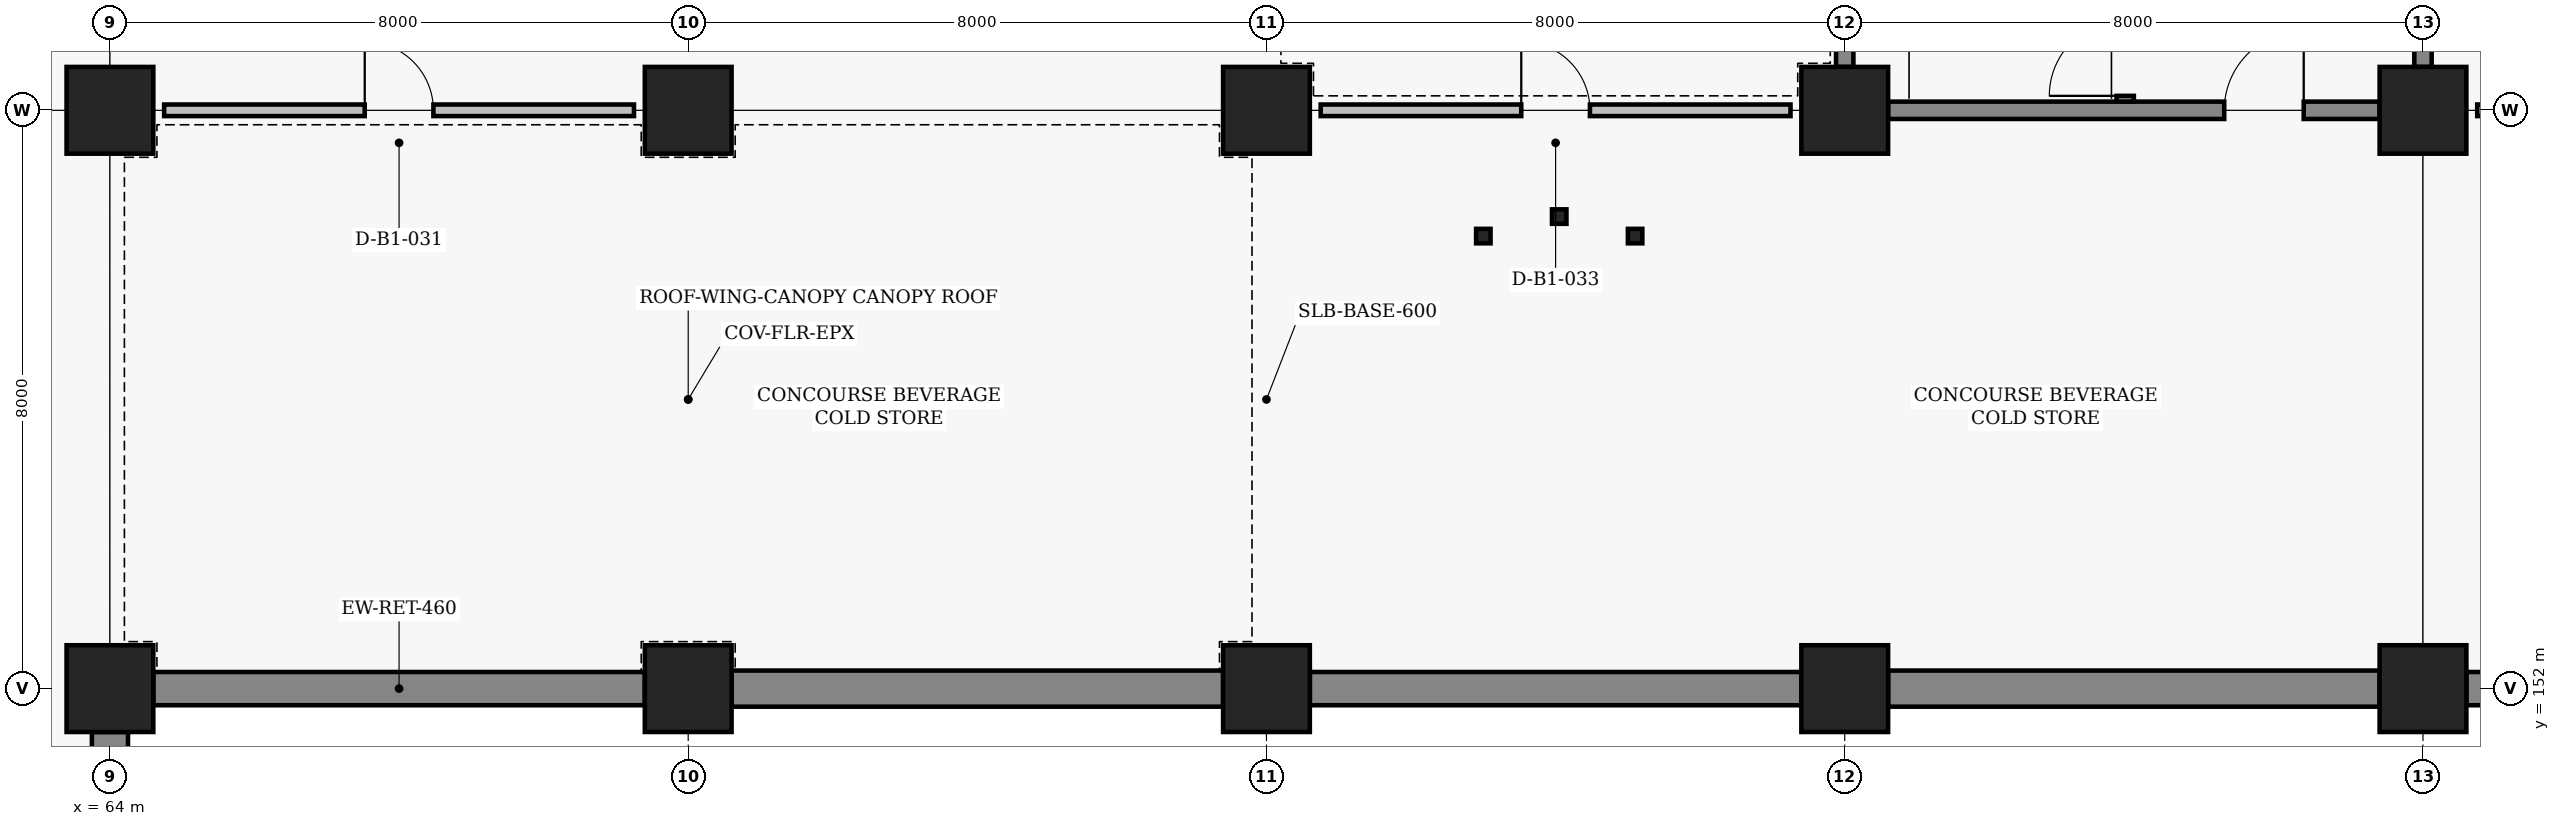
"""IFC4 building model, lengths in metres.
Left out: names, types, materials, properties, quantities, classifications, styles, units other than length and angle.
Written with IfcOpenShell. Run it as: python <this file> out.ifc"""

import sys

from ifc_helpers import new_model, si_unit, direction, frame, frame_2d, origin, origin_2d, place, context, subcontext, project, spatial, rectangle, hollow_rectangle, extrude, element, fill, save


model = new_model("IFC4")
c1 = context("Model", 3, precision=1e-05, world=origin(), true_north=direction((0.0, 1.0)))
c2 = subcontext(c1, "Body", "Model", "MODEL_VIEW")
j1 = project(units=[si_unit("LENGTHUNIT", "METRE"), si_unit("PLANEANGLEUNIT", "RADIAN")], contexts=[c1])
p1 = place(None, origin())
s1 = spatial("IfcSite", under=j1, at=p1, CompositionType="ELEMENT")
p2 = place(p1, origin())
s2 = spatial("IfcBuilding", under=s1, at=p2, CompositionType="ELEMENT")
p3 = place(p2, frame((0.0, 0.0, -5.4)))
s3 = spatial("IfcBuildingStorey", under=s2, at=p3, CompositionType="ELEMENT", Elevation=-5.4)
for number, where, z_axis, x_axis in (
    (1, (64.0, 152.0, 0.0), (0.0, 0.0, 1.0), (1.0, 0.0, 0.0)),
    (2, (64.0, 160.0, 0.0), (0.0, 0.0, 1.0), (1.0, 0.0, 0.0)),
    (3, (72.0, 152.0, 0.0), (0.0, 0.0, 1.0), (1.0, 0.0, 0.0)),
    (4, (72.0, 160.0, 0.0), (0.0, 0.0, 1.0), (1.0, 0.0, 0.0)),
    (5, (80.0, 152.0, 0.0), (0.0, 0.0, 1.0), (1.0, 0.0, 0.0)),
    (6, (80.0, 160.0, 0.0), (0.0, 0.0, 1.0), (1.0, 0.0, 0.0)),
    (7, (88.0, 152.0, 0.0), (0.0, 0.0, 1.0), (1.0, 0.0, 0.0)),
    (8, (88.0, 160.0, 0.0), (0.0, 0.0, 1.0), (1.0, 0.0, 0.0)),
    (9, (96.0, 152.0, 0.0), (0.0, 0.0, 1.0), (1.0, 0.0, 0.0)),
    (10, (96.0, 160.0, 0.0), (0.0, 0.0, 1.0), (1.0, 0.0, 0.0)),
):
    element("IfcColumn", number, at=place(p3, frame(where, z_axis=z_axis, x_axis=x_axis)), inside=s3, PredefinedType="COLUMN", context=c2, shape_type="SweptSolid", body=[
        extrude(rectangle(XDim=1.2, YDim=1.2, at=origin_2d()), origin(), (0.0, 0.0, 1.0), 5.4),
    ])
p4 = place(p3, frame((64.0, 144.6, 0.0), z_axis=(0.0, 0.0, 1.0), x_axis=(0.0, 1.0, 0.0)))
e11 = element("IfcWall", 11, at=p4, inside=s3, PredefinedType="STANDARD", context=c2, shape_type="SweptSolid", body=[
    extrude(rectangle(XDim=6.8, YDim=0.5, at=frame_2d((3.4, 0.0))), origin(), (0.0, 0.0, 1.0), 4.24),
])
p5 = place(p3, frame((64.6, 152.0, 0.0), z_axis=(0.0, 0.0, 1.0), x_axis=(1.0, 0.0, 0.0)))
e12 = element("IfcWall", 12, at=p5, inside=s3, PredefinedType="STANDARD", context=c2, shape_type="SweptSolid", body=[
    extrude(rectangle(XDim=6.8, YDim=0.46, at=frame_2d((3.4, 0.0))), origin(), (0.0, 0.0, 1.0), 4.24),
])
p6 = place(p3, frame((72.6, 152.0, 0.0), z_axis=(0.0, 0.0, 1.0), x_axis=(1.0, 0.0, 0.0)))
e13 = element("IfcWall", 13, at=p6, inside=s3, PredefinedType="STANDARD", context=c2, shape_type="SweptSolid", body=[
    extrude(rectangle(XDim=6.8, YDim=0.5, at=frame_2d((3.4, 0.0))), origin(), (0.0, 0.0, 1.0), 4.34),
])
p7 = place(p3, frame((80.6, 152.0, 0.0), z_axis=(0.0, 0.0, 1.0), x_axis=(1.0, 0.0, 0.0)))
e14 = element("IfcWall", 14, at=p7, inside=s3, PredefinedType="STANDARD", context=c2, shape_type="SweptSolid", body=[
    extrude(rectangle(XDim=6.8, YDim=0.46, at=frame_2d((3.4, 0.0))), origin(), (0.0, 0.0, 1.0), 4.34),
])
p8 = place(p3, frame((88.6, 152.0, 0.0), z_axis=(0.0, 0.0, 1.0), x_axis=(1.0, 0.0, 0.0)))
e15 = element("IfcWall", 15, at=p8, inside=s3, PredefinedType="STANDARD", context=c2, shape_type="SweptSolid", body=[
    extrude(rectangle(XDim=6.8, YDim=0.5, at=frame_2d((3.4, 0.0))), origin(), (0.0, 0.0, 1.0), 4.34),
])
p9 = place(p3, frame((96.6, 152.0, 0.0), z_axis=(0.0, 0.0, 1.0), x_axis=(1.0, 0.0, 0.0)))
e16 = element("IfcWall", 16, at=p9, inside=s3, PredefinedType="STANDARD", context=c2, shape_type="SweptSolid", body=[
    extrude(rectangle(XDim=6.8, YDim=0.46, at=frame_2d((3.4, 0.0))), origin(), (0.0, 0.0, 1.0), 4.34),
])
p10 = place(p3, frame((88.6, 160.0, 0.0), z_axis=(0.0, 0.0, 1.0), x_axis=(1.0, 0.0, 0.0)))
e17 = element("IfcWall", 17, at=p10, inside=s3, PredefinedType="SHEAR", context=c2, shape_type="SweptSolid", body=[
    extrude(rectangle(XDim=6.8, YDim=0.24, at=frame_2d((3.4, 0.0))), origin(), (0.0, 0.0, 1.0), 4.59),
])
p11 = place(p10, frame((4.65, 0.0, 0.0)))
e18 = element("IfcOpeningElement", 18, at=p11, cuts=e17, PredefinedType="OPENING", context=c2, shape_type="SweptSolid", body=[
    extrude(rectangle(XDim=1.1, YDim=2.2, at=frame_2d((0.55, 1.1))), frame((0.0, 0.13, 0.0), z_axis=(0.0, -1.0, 0.0), x_axis=(1.0, 0.0, 0.0)), (0.0, 0.0, 1.0), 0.26),
])
for number, where, z_axis, x_axis in (
    (19, (88.0, 160.6, 0.0), (0.0, 0.0, 1.0), (0.0, 1.0, 0.0)),
    (20, (96.0, 160.6, 0.0), (0.0, 0.0, 1.0), (0.0, 1.0, 0.0)),
):
    element("IfcWall", number, at=place(p3, frame(where, z_axis=z_axis, x_axis=x_axis)), inside=s3, PredefinedType="SHEAR", context=c2, shape_type="SweptSolid", body=[
        extrude(rectangle(XDim=6.8, YDim=0.24, at=frame_2d((3.4, 0.0))), origin(), (0.0, 0.0, 1.0), 4.39),
    ])
p12 = place(p3, frame((91.88, 160.12, 0.0), z_axis=(0.0, 0.0, 1.0), x_axis=(0.0, 1.0, 0.0)))
e21 = element("IfcWall", 21, at=p12, inside=s3, PredefinedType="SHEAR", context=c2, shape_type="SweptSolid", body=[
    extrude(rectangle(XDim=7.76, YDim=0.24, at=frame_2d((3.88, 0.0))), origin(), (0.0, 0.0, 1.0), 4.59),
])
p13 = place(p12, frame((0.08, 0.0, 0.0)))
e22 = element("IfcOpeningElement", 22, at=p13, cuts=e21, PredefinedType="OPENING", context=c2, shape_type="SweptSolid", body=[
    extrude(rectangle(XDim=1.05, YDim=2.15, at=frame_2d((0.525, 1.075))), frame((0.0, 0.13, 0.0), z_axis=(0.0, -1.0, 0.0), x_axis=(1.0, 0.0, 0.0)), (0.0, 0.0, 1.0), 0.26),
])
for number, where, z_axis, x_axis in (
    (23, (83.0, 158.26, 0.0), (0.0, 0.0, 1.0), (1.0, 0.0, 0.0)),
    (24, (85.1, 158.26, 0.0), (0.0, 0.0, 1.0), (1.0, 0.0, 0.0)),
    (25, (84.05, 158.53, 0.0), (0.0, 0.0, 1.0), (1.0, 0.0, 0.0)),
):
    element("IfcColumn", number, at=place(p3, frame(where, z_axis=z_axis, x_axis=x_axis)), inside=s3, PredefinedType="COLUMN", context=c2, shape_type="SweptSolid", body=[
        extrude(hollow_rectangle(XDim=0.2, YDim=0.2, WallThickness=0.009, at=origin_2d()), origin(), (0.0, 0.0, 1.0), 5.4),
    ])
p14 = place(p3, frame((64.75, 160.0, 0.0), z_axis=(0.0, 0.0, 1.0), x_axis=(1.0, 0.0, 0.0)))
e26 = element("IfcWall", 26, at=p14, inside=s3, PredefinedType="PARTITIONING", context=c2, shape_type="SweptSolid", body=[
    extrude(rectangle(XDim=6.5, YDim=0.16, at=frame_2d((3.25, 0.0))), origin(), (0.0, 0.0, 1.0), 3.69),
])
p15 = place(p14, frame((2.775, 0.0, 0.0)))
e27 = element("IfcOpeningElement", 27, at=p15, cuts=e26, PredefinedType="OPENING", context=c2, shape_type="SweptSolid", body=[
    extrude(rectangle(XDim=0.95, YDim=2.1, at=frame_2d((0.475, 1.05))), frame((0.0, 0.09, 0.0), z_axis=(0.0, -1.0, 0.0), x_axis=(1.0, 0.0, 0.0)), (0.0, 0.0, 1.0), 0.18),
])
p16 = place(p3, frame((80.75, 160.0, 0.0), z_axis=(0.0, 0.0, 1.0), x_axis=(1.0, 0.0, 0.0)))
e28 = element("IfcWall", 28, at=p16, inside=s3, PredefinedType="PARTITIONING", context=c2, shape_type="SweptSolid", body=[
    extrude(rectangle(XDim=6.5, YDim=0.16, at=frame_2d((3.25, 0.0))), origin(), (0.0, 0.0, 1.0), 4.49),
])
p17 = place(p16, frame((2.775, 0.0, 0.0)))
e29 = element("IfcOpeningElement", 29, at=p17, cuts=e28, PredefinedType="OPENING", context=c2, shape_type="SweptSolid", body=[
    extrude(rectangle(XDim=0.95, YDim=2.1, at=frame_2d((0.475, 1.05))), frame((0.0, 0.09, 0.0), z_axis=(0.0, -1.0, 0.0), x_axis=(1.0, 0.0, 0.0)), (0.0, 0.0, 1.0), 0.18),
])
p18 = place(p3, frame((96.75, 160.0, 0.0), z_axis=(0.0, 0.0, 1.0), x_axis=(1.0, 0.0, 0.0)))
e30 = element("IfcWall", 30, at=p18, inside=s3, PredefinedType="PARTITIONING", context=c2, shape_type="SweptSolid", body=[
    extrude(rectangle(XDim=6.5, YDim=0.16, at=frame_2d((3.25, 0.0))), origin(), (0.0, 0.0, 1.0), 4.49),
])
p19 = place(p18, frame((2.775, 0.0, 0.0)))
e31 = element("IfcOpeningElement", 31, at=p19, cuts=e30, PredefinedType="OPENING", context=c2, shape_type="SweptSolid", body=[
    extrude(rectangle(XDim=0.95, YDim=2.1, at=frame_2d((0.475, 1.05))), frame((0.0, 0.09, 0.0), z_axis=(0.0, -1.0, 0.0), x_axis=(1.0, 0.0, 0.0)), (0.0, 0.0, 1.0), 0.18),
])
p20 = place(p11, origin())
e32 = element("IfcDoor", 32, at=p20, inside=s3, OperationType="SINGLE_SWING_RIGHT", PredefinedType="DOOR", context=c2, shape_type="SweptSolid", body=[
    extrude(rectangle(XDim=1.1, YDim=2.2, at=frame_2d((0.55, 1.1))), frame((0.0, 0.025, 0.0), z_axis=(0.0, -1.0, 0.0), x_axis=(1.0, 0.0, 0.0)), (0.0, 0.0, 1.0), 0.05),
])
fill(e18, e32)
p21 = place(p13, origin())
e33 = element("IfcDoor", 33, at=p21, inside=s3, OperationType="SINGLE_SWING_LEFT", PredefinedType="DOOR", context=c2, shape_type="SweptSolid", body=[
    extrude(rectangle(XDim=1.05, YDim=2.15, at=frame_2d((0.525, 1.075))), frame((0.0, 0.025, 0.0), z_axis=(0.0, -1.0, 0.0), x_axis=(1.0, 0.0, 0.0)), (0.0, 0.0, 1.0), 0.05),
])
fill(e22, e33)
p22 = place(p15, origin())
e34 = element("IfcDoor", 34, at=p22, inside=s3, OperationType="SINGLE_SWING_LEFT", PredefinedType="DOOR", context=c2, shape_type="SweptSolid", body=[
    extrude(rectangle(XDim=0.95, YDim=2.1, at=frame_2d((0.475, 1.05))), frame((0.0, 0.025, 0.0), z_axis=(0.0, -1.0, 0.0), x_axis=(1.0, 0.0, 0.0)), (0.0, 0.0, 1.0), 0.05),
])
fill(e27, e34)
p23 = place(p17, origin())
e35 = element("IfcDoor", 35, at=p23, inside=s3, OperationType="SINGLE_SWING_LEFT", PredefinedType="DOOR", context=c2, shape_type="SweptSolid", body=[
    extrude(rectangle(XDim=0.95, YDim=2.1, at=frame_2d((0.475, 1.05))), frame((0.0, 0.025, 0.0), z_axis=(0.0, -1.0, 0.0), x_axis=(1.0, 0.0, 0.0)), (0.0, 0.0, 1.0), 0.05),
])
fill(e29, e35)
save(model, sys.argv[1])
